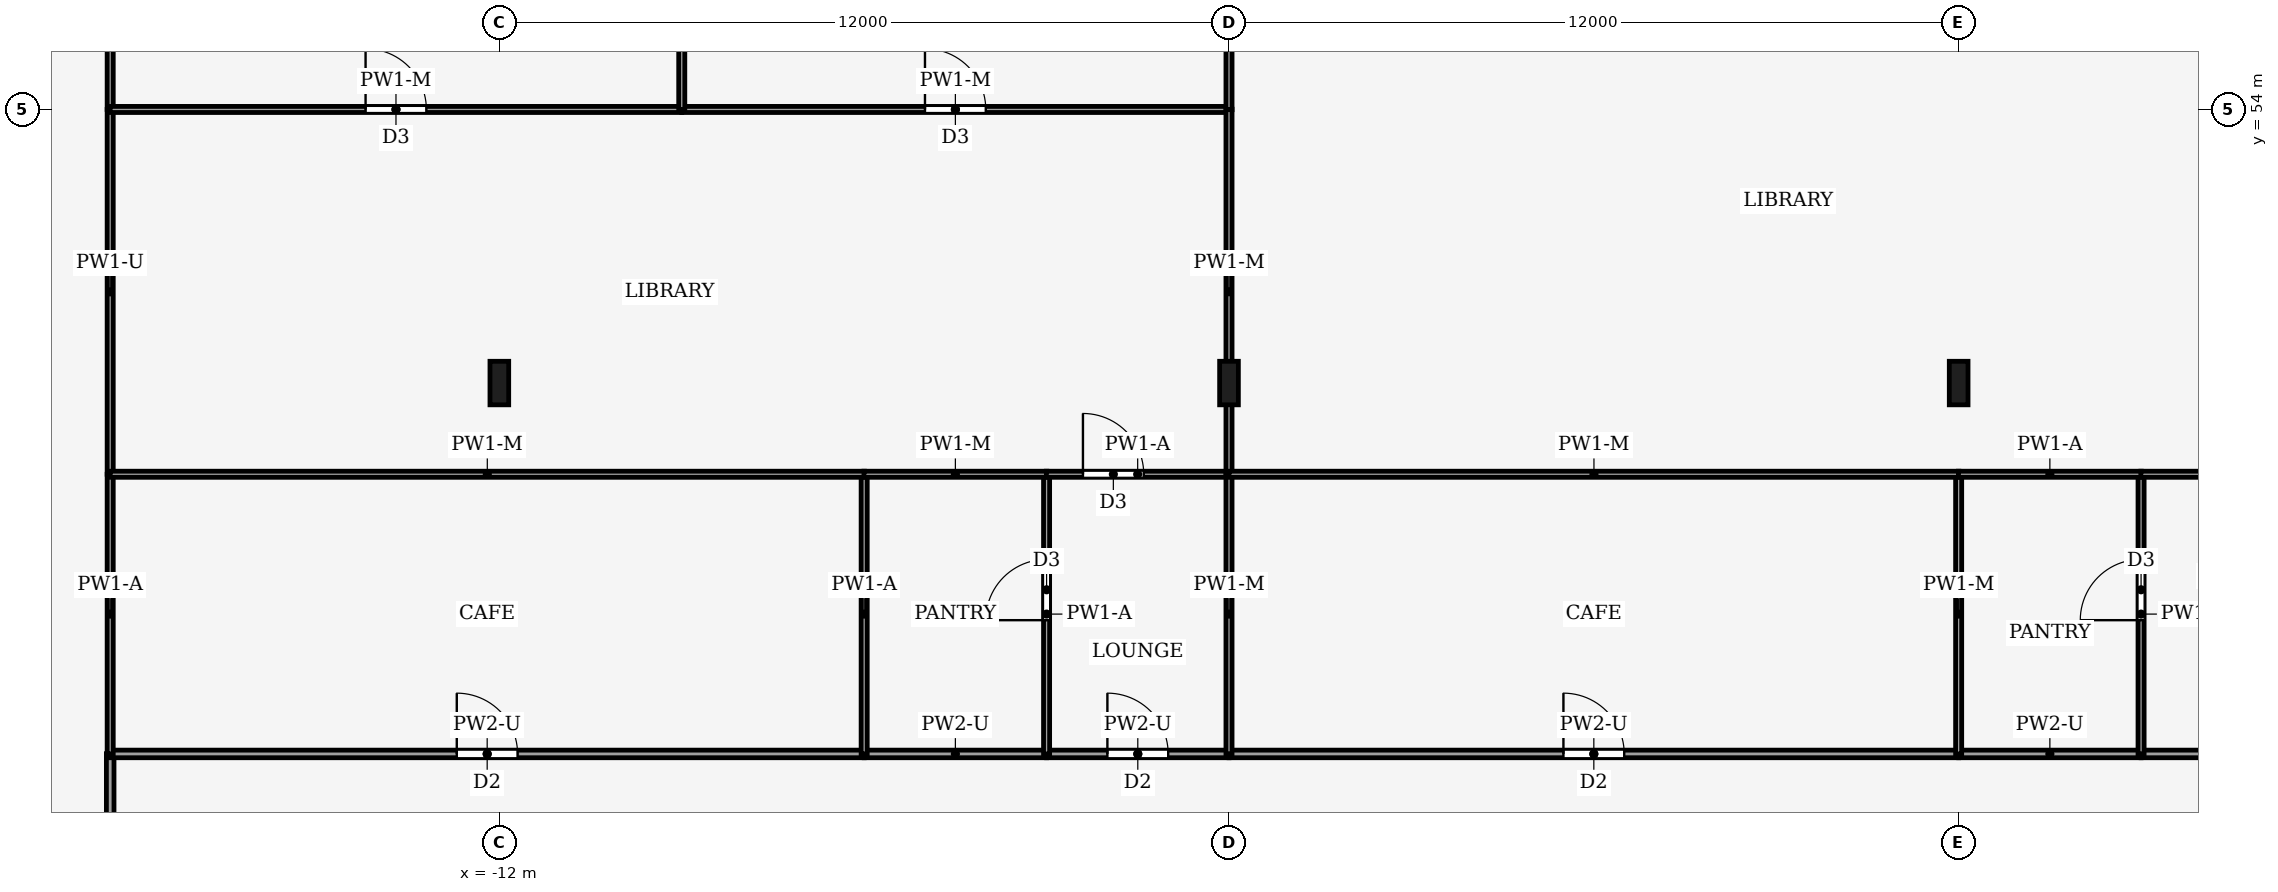
"""IFC4 building model, lengths in metres.
Left out: names, types, materials, properties, quantities, classifications, styles, units other than length and angle.
Written with IfcOpenShell. Run it as: python <this file> out.ifc"""

import sys

from ifc_helpers import new_model, si_unit, direction, frame, frame_2d, origin, origin_2d, place, context, subcontext, project, spatial, rectangle, i_section, extrude, element, fill, save


model = new_model("IFC4")
c1 = context("Model", 3, precision=1e-05, world=origin(), true_north=direction((0.0, 1.0)))
c2 = subcontext(c1, "Body", "Model", "MODEL_VIEW")
j1 = project(units=[si_unit("LENGTHUNIT", "METRE"), si_unit("PLANEANGLEUNIT", "RADIAN")], contexts=[c1])
p1 = place(None, origin())
s1 = spatial("IfcSite", under=j1, at=p1, CompositionType="ELEMENT")
p2 = place(p1, origin())
s2 = spatial("IfcBuilding", under=s1, at=p2, CompositionType="ELEMENT")
p3 = place(p2, frame((0.0, 0.0, 121.0)))
s3 = spatial("IfcBuildingStorey", under=s2, at=p3, CompositionType="ELEMENT", Elevation=121.0)
for number, where, z_axis, x_axis in (
    (1, (-12.0, 49.5, 0.0), (0.0, 0.0, 1.0), (1.0, 0.0, 0.0)),
    (2, (0.0, 49.5, 0.0), (0.0, 0.0, 1.0), (1.0, 0.0, 0.0)),
    (3, (12.0, 49.5, 0.0), (0.0, 0.0, 1.0), (1.0, 0.0, 0.0)),
):
    element("IfcColumn", number, at=place(p3, frame(where, z_axis=z_axis, x_axis=x_axis)), inside=s3, PredefinedType="COLUMN", context=c2, shape_type="SweptSolid", body=[
        extrude(i_section(OverallWidth=0.308, OverallDepth=0.716, WebThickness=0.021, FlangeThickness=0.04, FilletRadius=0.027, at=origin_2d()), origin(), (0.0, 0.0, 1.0), 5.0),
    ])
p4 = place(p3, frame((-18.4, 39.0, 0.0), z_axis=(0.0, 0.0, 1.0), x_axis=(0.0, 1.0, 0.0)))
e4 = element("IfcWall", 4, at=p4, inside=s3, PredefinedType="PARTITIONING", context=c2, shape_type="SweptSolid", body=[
    extrude(rectangle(XDim=4.404, YDim=0.125, at=frame_2d((2.202, 0.0))), origin(), (0.0, 0.0, 1.0), 4.87),
])
p5 = place(p4, frame((1.702, 0.0, 0.0)))
e5 = element("IfcOpeningElement", 5, at=p5, cuts=e4, PredefinedType="OPENING", context=c2, shape_type="SweptSolid", body=[
    extrude(rectangle(XDim=1.0, YDim=2.1, at=frame_2d((0.5, 1.05))), frame((0.0, 0.073, 0.0), z_axis=(0.0, -1.0, 0.0), x_axis=(1.0, 0.0, 0.0)), (0.0, 0.0, 1.0), 0.145),
])
p6 = place(p3, frame((-18.4, 43.4, 0.0), z_axis=(0.0, 0.0, 1.0), x_axis=(1.0, 0.0, 0.0)))
e6 = element("IfcWall", 6, at=p6, inside=s3, PredefinedType="PARTITIONING", context=c2, shape_type="SweptSolid", body=[
    extrude(rectangle(XDim=12.4, YDim=0.125, at=frame_2d((6.2, 0.0))), origin(), (0.0, 0.0, 1.0), 4.44),
])
p7 = place(p6, frame((5.7, 0.0, 0.0)))
e7 = element("IfcOpeningElement", 7, at=p7, cuts=e6, PredefinedType="OPENING", context=c2, shape_type="SweptSolid", body=[
    extrude(rectangle(XDim=1.0, YDim=2.1, at=frame_2d((0.5, 1.05))), frame((0.0, 0.073, 0.0), z_axis=(0.0, -1.0, 0.0), x_axis=(1.0, 0.0, 0.0)), (0.0, 0.0, 1.0), 0.145),
])
p8 = place(p3, frame((-3.0, 43.4, 0.0), z_axis=(0.0, 0.0, 1.0), x_axis=(-1.0, 0.0, 0.0)))
e8 = element("IfcWall", 8, at=p8, inside=s3, PredefinedType="PARTITIONING", context=c2, shape_type="SweptSolid", body=[
    extrude(rectangle(XDim=3.0, YDim=0.125, at=frame_2d((1.5, 0.0))), origin(), (0.0, 0.0, 1.0), 4.44),
])
p9 = place(p3, frame((-3.0, 43.4, 0.0), z_axis=(0.0, 0.0, 1.0), x_axis=(1.0, 0.0, 0.0)))
e9 = element("IfcWall", 9, at=p9, inside=s3, PredefinedType="PARTITIONING", context=c2, shape_type="SweptSolid", body=[
    extrude(rectangle(XDim=3.0, YDim=0.125, at=frame_2d((1.5, 0.0))), origin(), (0.0, 0.0, 1.0), 4.44),
])
p10 = place(p9, frame((1.0, 0.0, 0.0)))
e10 = element("IfcOpeningElement", 10, at=p10, cuts=e9, PredefinedType="OPENING", context=c2, shape_type="SweptSolid", body=[
    extrude(rectangle(XDim=1.0, YDim=2.1, at=frame_2d((0.5, 1.05))), frame((0.0, 0.073, 0.0), z_axis=(0.0, -1.0, 0.0), x_axis=(1.0, 0.0, 0.0)), (0.0, 0.0, 1.0), 0.145),
])
p11 = place(p3, frame((0.0, 43.4, 0.0), z_axis=(0.0, 0.0, 1.0), x_axis=(1.0, 0.0, 0.0)))
e11 = element("IfcWall", 11, at=p11, inside=s3, PredefinedType="PARTITIONING", context=c2, shape_type="SweptSolid", body=[
    extrude(rectangle(XDim=12.0, YDim=0.125, at=frame_2d((6.0, 0.0))), origin(), (0.0, 0.0, 1.0), 4.44),
])
p12 = place(p11, frame((5.5, 0.0, 0.0)))
e12 = element("IfcOpeningElement", 12, at=p12, cuts=e11, PredefinedType="OPENING", context=c2, shape_type="SweptSolid", body=[
    extrude(rectangle(XDim=1.0, YDim=2.1, at=frame_2d((0.5, 1.05))), frame((0.0, 0.073, 0.0), z_axis=(0.0, -1.0, 0.0), x_axis=(1.0, 0.0, 0.0)), (0.0, 0.0, 1.0), 0.145),
])
p13 = place(p3, frame((15.0, 43.4, 0.0), z_axis=(0.0, 0.0, 1.0), x_axis=(-1.0, 0.0, 0.0)))
e13 = element("IfcWall", 13, at=p13, inside=s3, PredefinedType="PARTITIONING", context=c2, shape_type="SweptSolid", body=[
    extrude(rectangle(XDim=3.0, YDim=0.125, at=frame_2d((1.5, 0.0))), origin(), (0.0, 0.0, 1.0), 4.44),
])
p14 = place(p3, frame((15.0, 43.4, 0.0), z_axis=(0.0, 0.0, 1.0), x_axis=(1.0, 0.0, 0.0)))
e14 = element("IfcWall", 14, at=p14, inside=s3, PredefinedType="PARTITIONING", context=c2, shape_type="SweptSolid", body=[
    extrude(rectangle(XDim=3.4, YDim=0.125, at=frame_2d((1.7, 0.0))), origin(), (0.0, 0.0, 1.0), 4.44),
])
p15 = place(p14, frame((1.2, 0.0, 0.0)))
e15 = element("IfcOpeningElement", 15, at=p15, cuts=e14, PredefinedType="OPENING", context=c2, shape_type="SweptSolid", body=[
    extrude(rectangle(XDim=1.0, YDim=2.1, at=frame_2d((0.5, 1.05))), frame((0.0, 0.073, 0.0), z_axis=(0.0, -1.0, 0.0), x_axis=(1.0, 0.0, 0.0)), (0.0, 0.0, 1.0), 0.145),
])
p16 = place(p3, frame((-18.4, 43.4, 0.0), z_axis=(0.0, 0.0, 1.0), x_axis=(0.0, 1.0, 0.0)))
e16 = element("IfcWall", 16, at=p16, inside=s3, PredefinedType="PARTITIONING", context=c2, shape_type="SweptSolid", body=[
    extrude(rectangle(XDim=4.6, YDim=0.1, at=frame_2d((2.3, 0.0))), origin(), (0.0, 0.0, 1.0), 4.87),
])
p17 = place(p3, frame((-18.4, 48.0, 0.0), z_axis=(0.0, 0.0, 1.0), x_axis=(0.0, 1.0, 0.0)))
e17 = element("IfcWall", 17, at=p17, inside=s3, PredefinedType="PARTITIONING", context=c2, shape_type="SweptSolid", body=[
    extrude(rectangle(XDim=6.0, YDim=0.1, at=frame_2d((3.0, 0.0))), origin(), (0.0, 0.0, 1.0), 4.24),
])
p18 = place(p3, frame((-18.4, 54.0, 0.0), z_axis=(0.0, 0.0, 1.0), x_axis=(0.0, 1.0, 0.0)))
e18 = element("IfcWall", 18, at=p18, inside=s3, PredefinedType="PARTITIONING", context=c2, shape_type="SweptSolid", body=[
    extrude(rectangle(XDim=7.0, YDim=0.1, at=frame_2d((3.5, 0.0))), origin(), (0.0, 0.0, 1.0), 3.93),
])
p19 = place(p3, frame((-6.0, 43.4, 0.0), z_axis=(0.0, 0.0, 1.0), x_axis=(0.0, 1.0, 0.0)))
e19 = element("IfcWall", 19, at=p19, inside=s3, PredefinedType="PARTITIONING", context=c2, shape_type="SweptSolid", body=[
    extrude(rectangle(XDim=4.6, YDim=0.1, at=frame_2d((2.3, 0.0))), origin(), (0.0, 0.0, 1.0), 4.87),
])
p20 = place(p3, frame((-5.996, 48.0, 0.0), z_axis=(0.0, 0.0, 1.0), x_axis=(-1.0, 0.0, 0.0)))
e20 = element("IfcWall", 20, at=p20, inside=s3, PredefinedType="PARTITIONING", context=c2, shape_type="SweptSolid", body=[
    extrude(rectangle(XDim=12.404, YDim=0.1, at=frame_2d((6.202, 0.0))), origin(), (0.0, 0.0, 1.0), 4.44),
])
p21 = place(p3, frame((-3.0, 43.4, 0.0), z_axis=(0.0, 0.0, 1.0), x_axis=(0.0, 1.0, 0.0)))
e21 = element("IfcWall", 21, at=p21, inside=s3, PredefinedType="PARTITIONING", context=c2, shape_type="SweptSolid", body=[
    extrude(rectangle(XDim=4.6, YDim=0.1, at=frame_2d((2.3, 0.0))), origin(), (0.0, 0.0, 1.0), 4.87),
])
p22 = place(p21, frame((2.2, 0.0, 0.0)))
e22 = element("IfcOpeningElement", 22, at=p22, cuts=e21, PredefinedType="OPENING", context=c2, shape_type="SweptSolid", body=[
    extrude(rectangle(XDim=1.0, YDim=2.1, at=frame_2d((0.5, 1.05))), frame((0.0, 0.06, 0.0), z_axis=(0.0, -1.0, 0.0), x_axis=(1.0, 0.0, 0.0)), (0.0, 0.0, 1.0), 0.12),
])
p23 = place(p3, frame((-2.996, 48.0, 0.0), z_axis=(0.0, 0.0, 1.0), x_axis=(-1.0, 0.0, 0.0)))
e23 = element("IfcWall", 23, at=p23, inside=s3, PredefinedType="PARTITIONING", context=c2, shape_type="SweptSolid", body=[
    extrude(rectangle(XDim=3.008, YDim=0.1, at=frame_2d((1.504, 0.0))), origin(), (0.0, 0.0, 1.0), 4.44),
])
p24 = place(p3, frame((-3.004, 48.0, 0.0), z_axis=(0.0, 0.0, 1.0), x_axis=(1.0, 0.0, 0.0)))
e24 = element("IfcWall", 24, at=p24, inside=s3, PredefinedType="PARTITIONING", context=c2, shape_type="SweptSolid", body=[
    extrude(rectangle(XDim=3.004, YDim=0.1, at=frame_2d((1.502, 0.0))), origin(), (0.0, 0.0, 1.0), 4.87),
])
p25 = place(p24, frame((0.602, 0.0, 0.0)))
e25 = element("IfcOpeningElement", 25, at=p25, cuts=e24, PredefinedType="OPENING", context=c2, shape_type="SweptSolid", body=[
    extrude(rectangle(XDim=1.0, YDim=2.1, at=frame_2d((0.5, 1.05))), frame((0.0, 0.06, 0.0), z_axis=(0.0, -1.0, 0.0), x_axis=(1.0, 0.0, 0.0)), (0.0, 0.0, 1.0), 0.12),
])
p26 = place(p3, frame((0.0, 43.4, 0.0), z_axis=(0.0, 0.0, 1.0), x_axis=(0.0, 1.0, 0.0)))
e26 = element("IfcWall", 26, at=p26, inside=s3, PredefinedType="PARTITIONING", context=c2, shape_type="SweptSolid", body=[
    extrude(rectangle(XDim=4.6, YDim=0.1, at=frame_2d((2.3, 0.0))), origin(), (0.0, 0.0, 1.0), 4.44),
])
p27 = place(p3, frame((-18.4, 54.0, 0.0), z_axis=(0.0, 0.0, 1.0), x_axis=(1.0, 0.0, 0.0)))
e27 = element("IfcWall", 27, at=p27, inside=s3, PredefinedType="PARTITIONING", context=c2, shape_type="SweptSolid", body=[
    extrude(rectangle(XDim=9.4, YDim=0.1, at=frame_2d((4.7, 0.0))), origin(), (0.0, 0.0, 1.0), 4.44),
])
p28 = place(p27, frame((4.2, 0.0, 0.0)))
e28 = element("IfcOpeningElement", 28, at=p28, cuts=e27, PredefinedType="OPENING", context=c2, shape_type="SweptSolid", body=[
    extrude(rectangle(XDim=1.0, YDim=2.1, at=frame_2d((0.5, 1.05))), frame((0.0, 0.06, 0.0), z_axis=(0.0, -1.0, 0.0), x_axis=(1.0, 0.0, 0.0)), (0.0, 0.0, 1.0), 0.12),
])
p29 = place(p3, frame((-9.0, 54.0, 0.0), z_axis=(0.0, 0.0, 1.0), x_axis=(1.0, 0.0, 0.0)))
e29 = element("IfcWall", 29, at=p29, inside=s3, PredefinedType="PARTITIONING", context=c2, shape_type="SweptSolid", body=[
    extrude(rectangle(XDim=9.0, YDim=0.1, at=frame_2d((4.5, 0.0))), origin(), (0.0, 0.0, 1.0), 4.44),
])
p30 = place(p29, frame((4.0, 0.0, 0.0)))
e30 = element("IfcOpeningElement", 30, at=p30, cuts=e29, PredefinedType="OPENING", context=c2, shape_type="SweptSolid", body=[
    extrude(rectangle(XDim=1.0, YDim=2.1, at=frame_2d((0.5, 1.05))), frame((0.0, 0.06, 0.0), z_axis=(0.0, -1.0, 0.0), x_axis=(1.0, 0.0, 0.0)), (0.0, 0.0, 1.0), 0.12),
])
p31 = place(p3, frame((0.0, 48.0, 0.0), z_axis=(0.0, 0.0, 1.0), x_axis=(0.0, 1.0, 0.0)))
e31 = element("IfcWall", 31, at=p31, inside=s3, PredefinedType="PARTITIONING", context=c2, shape_type="SweptSolid", body=[
    extrude(rectangle(XDim=6.004, YDim=0.1, at=frame_2d((3.002, 0.0))), origin(), (0.0, 0.0, 1.0), 4.44),
])
p32 = place(p3, frame((-9.0, 54.0, 0.0), z_axis=(0.0, 0.0, 1.0), x_axis=(0.0, 1.0, 0.0)))
e32 = element("IfcWall", 32, at=p32, inside=s3, PredefinedType="PARTITIONING", context=c2, shape_type="SweptSolid", body=[
    extrude(rectangle(XDim=6.33, YDim=0.1, at=frame_2d((3.165, 0.0))), origin(), (0.0, 0.0, 1.0), 4.04),
])
p33 = place(p3, frame((0.0, 53.996, 0.0), z_axis=(0.0, 0.0, 1.0), x_axis=(0.0, 1.0, 0.0)))
e33 = element("IfcWall", 33, at=p33, inside=s3, PredefinedType="PARTITIONING", context=c2, shape_type="SweptSolid", body=[
    extrude(rectangle(XDim=3.004, YDim=0.1, at=frame_2d((1.502, 0.0))), origin(), (0.0, 0.0, 1.0), 4.48),
])
p34 = place(p3, frame((12.0, 43.4, 0.0), z_axis=(0.0, 0.0, 1.0), x_axis=(0.0, 1.0, 0.0)))
e34 = element("IfcWall", 34, at=p34, inside=s3, PredefinedType="PARTITIONING", context=c2, shape_type="SweptSolid", body=[
    extrude(rectangle(XDim=4.6, YDim=0.1, at=frame_2d((2.3, 0.0))), origin(), (0.0, 0.0, 1.0), 4.44),
])
p35 = place(p3, frame((12.004, 48.0, 0.0), z_axis=(0.0, 0.0, 1.0), x_axis=(-1.0, 0.0, 0.0)))
e35 = element("IfcWall", 35, at=p35, inside=s3, PredefinedType="PARTITIONING", context=c2, shape_type="SweptSolid", body=[
    extrude(rectangle(XDim=12.004, YDim=0.1, at=frame_2d((6.002, 0.0))), origin(), (0.0, 0.0, 1.0), 4.44),
])
p36 = place(p3, frame((15.0, 43.4, 0.0), z_axis=(0.0, 0.0, 1.0), x_axis=(0.0, 1.0, 0.0)))
e36 = element("IfcWall", 36, at=p36, inside=s3, PredefinedType="PARTITIONING", context=c2, shape_type="SweptSolid", body=[
    extrude(rectangle(XDim=4.6, YDim=0.1, at=frame_2d((2.3, 0.0))), origin(), (0.0, 0.0, 1.0), 4.87),
])
p37 = place(p36, frame((2.2, 0.0, 0.0)))
e37 = element("IfcOpeningElement", 37, at=p37, cuts=e36, PredefinedType="OPENING", context=c2, shape_type="SweptSolid", body=[
    extrude(rectangle(XDim=1.0, YDim=2.1, at=frame_2d((0.5, 1.05))), frame((0.0, 0.06, 0.0), z_axis=(0.0, -1.0, 0.0), x_axis=(1.0, 0.0, 0.0)), (0.0, 0.0, 1.0), 0.12),
])
p38 = place(p3, frame((15.004, 48.0, 0.0), z_axis=(0.0, 0.0, 1.0), x_axis=(-1.0, 0.0, 0.0)))
e38 = element("IfcWall", 38, at=p38, inside=s3, PredefinedType="PARTITIONING", context=c2, shape_type="SweptSolid", body=[
    extrude(rectangle(XDim=3.008, YDim=0.1, at=frame_2d((1.504, 0.0))), origin(), (0.0, 0.0, 1.0), 4.87),
])
p39 = place(p3, frame((14.996, 48.0, 0.0), z_axis=(0.0, 0.0, 1.0), x_axis=(1.0, 0.0, 0.0)))
e39 = element("IfcWall", 39, at=p39, inside=s3, PredefinedType="PARTITIONING", context=c2, shape_type="SweptSolid", body=[
    extrude(rectangle(XDim=3.404, YDim=0.1, at=frame_2d((1.702, 0.0))), origin(), (0.0, 0.0, 1.0), 4.44),
])
p40 = place(p39, frame((2.002, 0.0, 0.0)))
e40 = element("IfcOpeningElement", 40, at=p40, cuts=e39, PredefinedType="OPENING", context=c2, shape_type="SweptSolid", body=[
    extrude(rectangle(XDim=1.0, YDim=2.1, at=frame_2d((0.5, 1.05))), frame((0.0, 0.06, 0.0), z_axis=(0.0, -1.0, 0.0), x_axis=(1.0, 0.0, 0.0)), (0.0, 0.0, 1.0), 0.12),
])
p41 = place(p7, origin())
e41 = element("IfcDoor", 41, at=p41, inside=s3, OperationType="SINGLE_SWING_LEFT", PredefinedType="DOOR", context=c2, shape_type="SweptSolid", body=[
    extrude(rectangle(XDim=1.0, YDim=2.1, at=frame_2d((0.5, 1.05))), frame((0.0, 0.025, 0.0), z_axis=(0.0, -1.0, 0.0), x_axis=(1.0, 0.0, 0.0)), (0.0, 0.0, 1.0), 0.05),
])
fill(e7, e41)
p42 = place(p10, origin())
e42 = element("IfcDoor", 42, at=p42, inside=s3, OperationType="SINGLE_SWING_RIGHT", PredefinedType="DOOR", context=c2, shape_type="SweptSolid", body=[
    extrude(rectangle(XDim=1.0, YDim=2.1, at=frame_2d((0.5, 1.05))), frame((0.0, 0.025, 0.0), z_axis=(0.0, -1.0, 0.0), x_axis=(1.0, 0.0, 0.0)), (0.0, 0.0, 1.0), 0.05),
])
fill(e10, e42)
p43 = place(p12, origin())
e43 = element("IfcDoor", 43, at=p43, inside=s3, OperationType="SINGLE_SWING_LEFT", PredefinedType="DOOR", context=c2, shape_type="SweptSolid", body=[
    extrude(rectangle(XDim=1.0, YDim=2.1, at=frame_2d((0.5, 1.05))), frame((0.0, 0.025, 0.0), z_axis=(0.0, -1.0, 0.0), x_axis=(1.0, 0.0, 0.0)), (0.0, 0.0, 1.0), 0.05),
])
fill(e12, e43)
p44 = place(p22, origin())
e44 = element("IfcDoor", 44, at=p44, inside=s3, OperationType="SINGLE_SWING_RIGHT", PredefinedType="DOOR", context=c2, shape_type="SweptSolid", body=[
    extrude(rectangle(XDim=1.0, YDim=2.1, at=frame_2d((0.5, 1.05))), frame((0.0, 0.025, 0.0), z_axis=(0.0, -1.0, 0.0), x_axis=(1.0, 0.0, 0.0)), (0.0, 0.0, 1.0), 0.05),
])
fill(e22, e44)
p45 = place(p25, origin())
e45 = element("IfcDoor", 45, at=p45, inside=s3, OperationType="SINGLE_SWING_LEFT", PredefinedType="DOOR", context=c2, shape_type="SweptSolid", body=[
    extrude(rectangle(XDim=1.0, YDim=2.1, at=frame_2d((0.5, 1.05))), frame((0.0, 0.025, 0.0), z_axis=(0.0, -1.0, 0.0), x_axis=(1.0, 0.0, 0.0)), (0.0, 0.0, 1.0), 0.05),
])
fill(e25, e45)
p46 = place(p28, origin())
e46 = element("IfcDoor", 46, at=p46, inside=s3, OperationType="SINGLE_SWING_RIGHT", PredefinedType="DOOR", context=c2, shape_type="SweptSolid", body=[
    extrude(rectangle(XDim=1.0, YDim=2.1, at=frame_2d((0.5, 1.05))), frame((0.0, 0.025, 0.0), z_axis=(0.0, -1.0, 0.0), x_axis=(1.0, 0.0, 0.0)), (0.0, 0.0, 1.0), 0.05),
])
fill(e28, e46)
p47 = place(p30, origin())
e47 = element("IfcDoor", 47, at=p47, inside=s3, OperationType="SINGLE_SWING_LEFT", PredefinedType="DOOR", context=c2, shape_type="SweptSolid", body=[
    extrude(rectangle(XDim=1.0, YDim=2.1, at=frame_2d((0.5, 1.05))), frame((0.0, 0.025, 0.0), z_axis=(0.0, -1.0, 0.0), x_axis=(1.0, 0.0, 0.0)), (0.0, 0.0, 1.0), 0.05),
])
fill(e30, e47)
p48 = place(p37, origin())
e48 = element("IfcDoor", 48, at=p48, inside=s3, OperationType="SINGLE_SWING_RIGHT", PredefinedType="DOOR", context=c2, shape_type="SweptSolid", body=[
    extrude(rectangle(XDim=1.0, YDim=2.1, at=frame_2d((0.5, 1.05))), frame((0.0, 0.025, 0.0), z_axis=(0.0, -1.0, 0.0), x_axis=(1.0, 0.0, 0.0)), (0.0, 0.0, 1.0), 0.05),
])
fill(e37, e48)
save(model, sys.argv[1])
